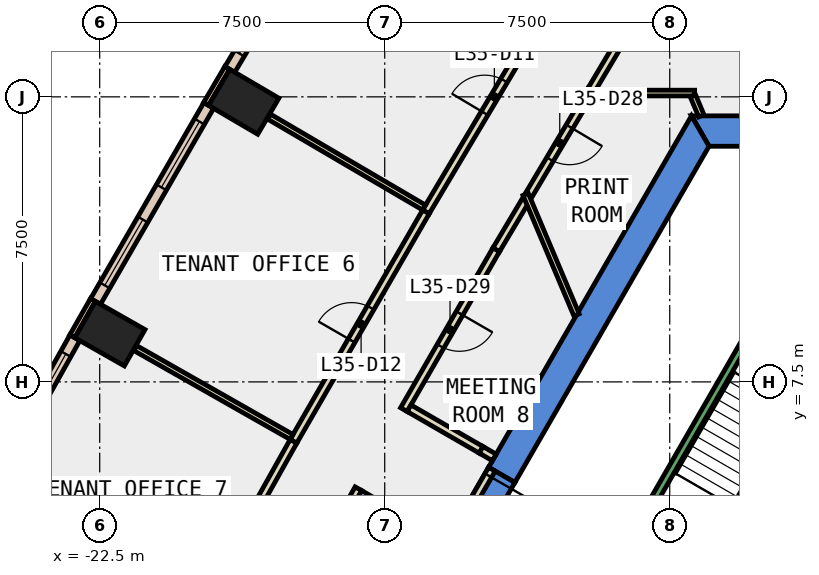
"""IFC4 building model, lengths in metres.
Left out: names, types, materials, properties, quantities, classifications, styles, units other than length and angle.
Written with IfcOpenShell. Run it as: python <this file> out.ifc"""

import sys

from ifc_helpers import new_model, si_unit, direction, frame, frame_2d, origin, origin_2d, place, context, subcontext, project, spatial, polyline, rectangle, outline, extrude, element, fill, save


model = new_model("IFC4")
c1 = context("Model", 3, precision=1e-05, world=origin(), true_north=direction((0.0, 1.0)))
c2 = subcontext(c1, "Body", "Model", "MODEL_VIEW")
j1 = project(units=[si_unit("LENGTHUNIT", "METRE"), si_unit("PLANEANGLEUNIT", "RADIAN")], contexts=[c1])
p1 = place(None, origin())
s1 = spatial("IfcSite", under=j1, at=p1, CompositionType="ELEMENT")
p2 = place(p1, origin())
s2 = spatial("IfcBuilding", under=s1, at=p2, CompositionType="ELEMENT")
p3 = place(p2, frame((0.0, 0.0, 159.2)))
s3 = spatial("IfcBuildingStorey", under=s2, at=p3, CompositionType="ELEMENT", Elevation=159.2)
for number, where, z_axis, x_axis in (
    (1, (-18.71, 14.87, -0.4), (0.0, 0.0, 1.0), (0.506, 0.863, 0.0)),
    (2, (-22.232, 8.769, -0.4), (0.0, 0.0, 1.0), (0.494, 0.869, 0.0)),
):
    element("IfcColumn", number, at=place(p3, frame(where, z_axis=z_axis, x_axis=x_axis)), inside=s3, PredefinedType="COLUMN", context=c2, shape_type="SweptSolid", body=[
        extrude(rectangle(XDim=1.1, YDim=1.5, at=origin_2d()), origin(), (0.0, 0.0, 1.0), 4.2),
    ])
p4 = place(p3, frame((0.0, 0.0, -0.4)))
e3 = element("IfcWall", 3, at=p4, inside=s3, PredefinedType="SHEAR", context=c2, shape_type="SweptSolid", body=[
    extrude(outline(polyline([(6.928, 14.5), (-6.928, 14.5), (-6.466, 13.7), (6.466, 13.7), (6.928, 14.5)])), origin(), (0.0, 0.0, 1.0), 4.2),
])
p5 = place(p3, frame((0.0, 0.0, -0.4)))
e4 = element("IfcWall", 4, at=p5, inside=s3, PredefinedType="SHEAR", context=c2, shape_type="SweptSolid", body=[
    extrude(outline(polyline([(-12.267, 5.252), (-11.575, 4.852), (-6.466, 13.7), (-6.928, 14.5), (-12.267, 5.252)])), origin(), (0.0, 0.0, 1.0), 4.2),
])
p6 = place(p3, frame((0.0, 0.0, 3.6)))
e5 = element("IfcWall", 5, at=p6, inside=s3, PredefinedType="SHEAR", context=c2, shape_type="SweptSolid", body=[
    extrude(outline(polyline([(-13.267, 3.52), (-12.575, 3.12), (-11.575, 4.852), (-12.267, 5.252), (-13.267, 3.52)])), origin(), (0.0, 0.0, 1.0), 0.2),
])
p7 = place(p3, frame((-19.143, 15.761, 0.0), z_axis=(0.0, 0.0, 1.0), x_axis=(-0.506505715302, -0.862236603472, 0.0)))
e6 = element("IfcWall", 6, at=p7, inside=s3, PredefinedType="STANDARD", context=c2, shape_type="SweptSolid", body=[
    extrude(rectangle(XDim=1.099, YDim=0.15, at=frame_2d((0.55, 0.0))), origin(), (0.0, 0.0, 1.0), 3.8),
])
p8 = place(p3, frame((-22.678, 9.655, 0.0), z_axis=(0.0, 0.0, 1.0), x_axis=(-0.494512685492, -0.869170411305, 0.0)))
e7 = element("IfcWall", 7, at=p8, inside=s3, PredefinedType="STANDARD", context=c2, shape_type="SweptSolid", body=[
    extrude(rectangle(XDim=1.1, YDim=0.15, at=frame_2d((0.55, 0.0))), origin(), (0.0, 0.0, 1.0), 3.8),
])
p9 = place(p3, frame((-16.029, 20.84, 0.0), z_axis=(0.0, 0.0, 1.0), x_axis=(-0.511455040009, -0.859310038374, 0.0)))
e8 = element("IfcWall", 8, at=p9, inside=s3, PredefinedType="STANDARD", context=c2, shape_type="SweptSolid", body=[
    extrude(rectangle(XDim=5.957, YDim=0.3, at=frame_2d((2.979, 0.0))), origin(), (0.0, 0.0, 1.0), 3.8),
])
p10 = place(p9, frame((0.489, 0.0, 0.9)))
e9 = element("IfcOpeningElement", 9, at=p10, cuts=e8, PredefinedType="OPENING", context=c2, shape_type="SweptSolid", body=[
    extrude(rectangle(XDim=2.0, YDim=2.6, at=frame_2d((1.0, 1.3))), frame((0.0, 0.16, 0.0), z_axis=(0.0, -1.0, 0.0), x_axis=(1.0, 0.0, 0.0)), (0.0, 0.0, 1.0), 0.32),
])
p11 = place(p9, frame((3.468, 0.0, 0.9)))
e10 = element("IfcOpeningElement", 10, at=p11, cuts=e8, PredefinedType="OPENING", context=c2, shape_type="SweptSolid", body=[
    extrude(rectangle(XDim=2.0, YDim=2.6, at=frame_2d((1.0, 1.3))), frame((0.0, 0.16, 0.0), z_axis=(0.0, -1.0, 0.0), x_axis=(1.0, 0.0, 0.0)), (0.0, 0.0, 1.0), 0.32),
])
p12 = place(p3, frame((-19.631, 14.774, 0.0), z_axis=(0.0, 0.0, 1.0), x_axis=(-0.500061823953, -0.865989706766, 0.0)))
e11 = element("IfcWall", 11, at=p12, inside=s3, PredefinedType="STANDARD", context=c2, shape_type="SweptSolid", body=[
    extrude(rectangle(XDim=5.957, YDim=0.3, at=frame_2d((2.979, 0.0))), origin(), (0.0, 0.0, 1.0), 3.8),
])
p13 = place(p12, frame((0.489, 0.0, 0.9)))
e12 = element("IfcOpeningElement", 12, at=p13, cuts=e11, PredefinedType="OPENING", context=c2, shape_type="SweptSolid", body=[
    extrude(rectangle(XDim=2.0, YDim=2.6, at=frame_2d((1.0, 1.3))), frame((0.0, 0.16, 0.0), z_axis=(0.0, -1.0, 0.0), x_axis=(1.0, 0.0, 0.0)), (0.0, 0.0, 1.0), 0.32),
])
p14 = place(p12, frame((3.468, 0.0, 0.9)))
e13 = element("IfcOpeningElement", 13, at=p14, cuts=e11, PredefinedType="OPENING", context=c2, shape_type="SweptSolid", body=[
    extrude(rectangle(XDim=2.0, YDim=2.6, at=frame_2d((1.0, 1.3))), frame((0.0, 0.16, 0.0), z_axis=(0.0, -1.0, 0.0), x_axis=(1.0, 0.0, 0.0)), (0.0, 0.0, 1.0), 0.32),
])
p15 = place(p3, frame((-23.153, 8.661, 0.0), z_axis=(0.0, 0.0, 1.0), x_axis=(-0.488354983501, -0.872645065356, 0.0)))
e14 = element("IfcWall", 14, at=p15, inside=s3, PredefinedType="STANDARD", context=c2, shape_type="SweptSolid", body=[
    extrude(rectangle(XDim=5.957, YDim=0.3, at=frame_2d((2.978, 0.0))), origin(), (0.0, 0.0, 1.0), 3.8),
])
p16 = place(p15, frame((0.489, 0.0, 0.9)))
e15 = element("IfcOpeningElement", 15, at=p16, cuts=e14, PredefinedType="OPENING", context=c2, shape_type="SweptSolid", body=[
    extrude(rectangle(XDim=2.0, YDim=2.6, at=frame_2d((1.0, 1.3))), frame((0.0, 0.16, 0.0), z_axis=(0.0, -1.0, 0.0), x_axis=(1.0, 0.0, 0.0)), (0.0, 0.0, 1.0), 0.32),
])
p17 = place(p15, frame((3.467, 0.0, 0.9)))
e16 = element("IfcOpeningElement", 16, at=p17, cuts=e14, PredefinedType="OPENING", context=c2, shape_type="SweptSolid", body=[
    extrude(rectangle(XDim=2.0, YDim=2.6, at=frame_2d((1.0, 1.3))), frame((0.0, 0.16, 0.0), z_axis=(0.0, -1.0, 0.0), x_axis=(1.0, 0.0, 0.0)), (0.0, 0.0, 1.0), 0.32),
])
p18 = place(p3, frame((-9.574, 15.164, 0.0), z_axis=(0.0, 0.0, 1.0), x_axis=(-0.511482522046, -0.859293680671, 0.0)))
e17 = element("IfcWall", 17, at=p18, inside=s3, PredefinedType="PARTITIONING", context=c2, shape_type="SweptSolid", body=[
    extrude(rectangle(XDim=3.208, YDim=0.2, at=frame_2d((1.604, 0.0))), origin(), (0.0, 0.0, 1.0), 3.8),
])
p19 = place(p18, frame((1.104, 0.0, 0.0)))
e18 = element("IfcOpeningElement", 18, at=p19, cuts=e17, PredefinedType="OPENING", context=c2, shape_type="SweptSolid", body=[
    extrude(rectangle(XDim=1.0, YDim=2.1, at=frame_2d((0.5, 1.05))), frame((0.0, 0.11, 0.0), z_axis=(0.0, -1.0, 0.0), x_axis=(1.0, 0.0, 0.0)), (0.0, 0.0, 1.0), 0.22),
])
p20 = place(p3, frame((-11.291, 12.278, 0.0), z_axis=(0.0, 0.0, 1.0), x_axis=(-0.511628198266, -0.859206952217, 0.0)))
e19 = element("IfcWall", 19, at=p20, inside=s3, PredefinedType="PARTITIONING", context=c2, shape_type="SweptSolid", body=[
    extrude(rectangle(XDim=1.517, YDim=0.2, at=frame_2d((0.758, 0.0))), origin(), (0.0, 0.0, 1.0), 3.8),
])
p21 = place(p3, frame((-12.067, 10.975, 0.0), z_axis=(0.0, 0.0, 1.0), x_axis=(-0.500215616273, -0.865900881878, 0.0)))
e20 = element("IfcWall", 20, at=p21, inside=s3, PredefinedType="PARTITIONING", context=c2, shape_type="SweptSolid", body=[
    extrude(rectangle(XDim=4.856, YDim=0.2, at=frame_2d((2.428, 0.0))), origin(), (0.0, 0.0, 1.0), 3.8),
])
p22 = place(p21, frame((1.928, 0.0, 0.0)))
e21 = element("IfcOpeningElement", 21, at=p22, cuts=e20, PredefinedType="OPENING", context=c2, shape_type="SweptSolid", body=[
    extrude(rectangle(XDim=1.0, YDim=2.1, at=frame_2d((0.5, 1.05))), frame((0.0, 0.11, 0.0), z_axis=(0.0, -1.0, 0.0), x_axis=(1.0, 0.0, 0.0)), (0.0, 0.0, 1.0), 0.22),
])
p23 = place(p3, frame((-14.359, 6.806, 0.0), z_axis=(0.0, 0.0, 1.0), x_axis=(0.866155875717, -0.499773947861, 0.0)))
e22 = element("IfcWall", 22, at=p23, inside=s3, PredefinedType="PARTITIONING", context=c2, shape_type="SweptSolid", body=[
    extrude(rectangle(XDim=2.189, YDim=0.2, at=frame_2d((1.094, 0.0))), origin(), (0.0, 0.0, 1.0), 3.8),
])
p24 = place(p3, frame((-8.516, 16.942, 0.0), z_axis=(0.0, 0.0, 1.0), x_axis=(-0.511351070319, -0.859371911854, 0.0)))
e23 = element("IfcWall", 23, at=p24, inside=s3, PredefinedType="PARTITIONING", context=c2, shape_type="SweptSolid", body=[
    extrude(rectangle(XDim=2.069, YDim=0.2, at=frame_2d((1.034, 0.0))), origin(), (0.0, 0.0, 1.0), 3.8),
])
p25 = place(p3, frame((-15.692, 4.689, 0.0), z_axis=(0.0, 0.0, 1.0), x_axis=(-0.48849233301, -0.872568186786, 0.0)))
e24 = element("IfcWall", 24, at=p25, inside=s3, PredefinedType="PARTITIONING", context=c2, shape_type="SweptSolid", body=[
    extrude(rectangle(XDim=6.629, YDim=0.2, at=frame_2d((3.314, 0.0))), origin(), (0.0, 0.0, 1.0), 3.8),
])
p26 = place(p25, frame((2.814, 0.0, 0.0)))
e25 = element("IfcOpeningElement", 25, at=p26, cuts=e24, PredefinedType="OPENING", context=c2, shape_type="SweptSolid", body=[
    extrude(rectangle(XDim=1.0, YDim=2.1, at=frame_2d((0.5, 1.05))), frame((0.0, 0.11, 0.0), z_axis=(0.0, -1.0, 0.0), x_axis=(1.0, 0.0, 0.0)), (0.0, 0.0, 1.0), 0.22),
])
p27 = place(p3, frame((-13.917, 11.973, 0.0), z_axis=(0.0, 0.0, 1.0), x_axis=(0.511455840413, 0.859309561978, 0.0)))
e26 = element("IfcWall", 26, at=p27, inside=s3, PredefinedType="PARTITIONING", context=c2, shape_type="SweptSolid", body=[
    extrude(rectangle(XDim=7.047, YDim=0.2, at=frame_2d((3.523, 0.0))), origin(), (0.0, 0.0, 1.0), 3.8),
])
p28 = place(p27, frame((3.023, 0.0, 0.0)))
e27 = element("IfcOpeningElement", 27, at=p28, cuts=e26, PredefinedType="OPENING", context=c2, shape_type="SweptSolid", body=[
    extrude(rectangle(XDim=1.0, YDim=2.1, at=frame_2d((0.5, 1.05))), frame((0.0, 0.11, 0.0), z_axis=(0.0, -1.0, 0.0), x_axis=(1.0, 0.0, 0.0)), (0.0, 0.0, 1.0), 0.22),
])
p29 = place(p3, frame((-17.402, 5.936, 0.0), z_axis=(0.0, 0.0, 1.0), x_axis=(0.500135788517, 0.865946992052, 0.0)))
e28 = element("IfcWall", 28, at=p29, inside=s3, PredefinedType="PARTITIONING", context=c2, shape_type="SweptSolid", body=[
    extrude(rectangle(XDim=6.97, YDim=0.2, at=frame_2d((3.485, 0.0))), origin(), (0.0, 0.0, 1.0), 3.8),
])
p30 = place(p29, frame((3.06, 0.0, 0.0)))
e29 = element("IfcOpeningElement", 29, at=p30, cuts=e28, PredefinedType="OPENING", context=c2, shape_type="SweptSolid", body=[
    extrude(rectangle(XDim=1.0, YDim=2.1, at=frame_2d((0.5, 1.05))), frame((0.0, 0.11, 0.0), z_axis=(0.0, -1.0, 0.0), x_axis=(1.0, 0.0, 0.0)), (0.0, 0.0, 1.0), 0.22),
])
p31 = place(p3, frame((-20.769, -0.082, 0.0), z_axis=(0.0, 0.0, 1.0), x_axis=(0.488387759141, 0.872626722443, 0.0)))
e30 = element("IfcWall", 30, at=p31, inside=s3, PredefinedType="PARTITIONING", context=c2, shape_type="SweptSolid", body=[
    extrude(rectangle(XDim=6.896, YDim=0.2, at=frame_2d((3.448, 0.0))), origin(), (0.0, 0.0, 1.0), 3.8),
])
p32 = place(p3, frame((-9.952, 9.262, 0.0), z_axis=(0.0, 0.0, 1.0), x_axis=(-0.38905491579, 0.921214563769, 0.0)))
e31 = element("IfcWall", 31, at=p32, inside=s3, PredefinedType="PARTITIONING", context=c2, shape_type="SweptSolid", body=[
    extrude(rectangle(XDim=3.445, YDim=0.15, at=frame_2d((1.722, 0.0))), origin(), (0.0, 0.0, 1.0), 3.8),
])
p33 = place(p3, frame((-6.846, 15.1, 0.0), z_axis=(0.0, 0.0, 1.0), x_axis=(-1.0, 0.0, 0.0)))
e32 = element("IfcWall", 32, at=p33, inside=s3, PredefinedType="PARTITIONING", context=c2, shape_type="SweptSolid", body=[
    extrude(rectangle(XDim=2.766, YDim=0.15, at=frame_2d((1.383, 0.0))), origin(), (0.0, 0.0, 1.0), 3.8),
])
p34 = place(p3, frame((-6.668, 14.5, 0.0), z_axis=(0.0, 0.0, 1.0), x_axis=(-0.388852201086, 0.921300149631, 0.0)))
e33 = element("IfcWall", 33, at=p34, inside=s3, PredefinedType="PARTITIONING", context=c2, shape_type="SweptSolid", body=[
    extrude(rectangle(XDim=0.576, YDim=0.15, at=frame_2d((0.288, 0.0))), origin(), (0.0, 0.0, 1.0), 3.8),
])
p35 = place(p3, frame((-13.965, 12.088, 0.0), z_axis=(0.0, 0.0, 1.0), x_axis=(-0.862617990649, 0.50585591052, 0.0)))
e34 = element("IfcWall", 34, at=p35, inside=s3, PredefinedType="PARTITIONING", context=c2, shape_type="SweptSolid", body=[
    extrude(rectangle(XDim=4.731, YDim=0.15, at=frame_2d((2.365, 0.0))), origin(), (0.0, 0.0, 1.0), 3.8),
])
p36 = place(p3, frame((-17.451, 6.051, 0.0), z_axis=(0.0, 0.0, 1.0), x_axis=(-0.869409691741, 0.494091882049, 0.0)))
e35 = element("IfcWall", 35, at=p36, inside=s3, PredefinedType="PARTITIONING", context=c2, shape_type="SweptSolid", body=[
    extrude(rectangle(XDim=4.73, YDim=0.15, at=frame_2d((2.365, 0.0))), origin(), (0.0, 0.0, 1.0), 3.8),
])
p37 = place(p3, frame((-12.18, 5.202, 0.0), z_axis=(0.0, 0.0, 1.0), x_axis=(-0.50002537861, -0.866010750942, 0.0)))
e36 = element("IfcWall", 36, at=p37, inside=s3, PredefinedType="PARTITIONING", context=c2, shape_type="SweptSolid", body=[
    extrude(rectangle(XDim=2.0, YDim=0.2, at=frame_2d((1.0, 0.0))), origin(), (0.0, 0.0, 1.0), 2.4),
])
p38 = place(p37, frame((0.19, 0.0, 0.0)))
e37 = element("IfcOpeningElement", 37, at=p38, cuts=e36, PredefinedType="OPENING", context=c2, shape_type="SweptSolid", body=[
    extrude(rectangle(XDim=1.8, YDim=2.1, at=frame_2d((0.9, 1.05))), frame((0.0, 0.11, 0.0), z_axis=(0.0, -1.0, 0.0), x_axis=(1.0, 0.0, 0.0)), (0.0, 0.0, 1.0), 0.22),
])
p39 = place(p3, frame((-12.463, 5.712, 0.0), z_axis=(0.0, 0.0, 1.0), x_axis=(0.865788603161, -0.500409926597, 0.0)))
e38 = element("IfcWall", 38, at=p39, inside=s3, PredefinedType="PARTITIONING", context=c2, shape_type="SweptSolid", body=[
    extrude(rectangle(XDim=0.4, YDim=0.2, at=frame_2d((0.2, 0.0))), origin(), (0.0, 0.0, 1.0), 2.4),
])
p40 = place(p3, frame((-13.764, 3.46, 0.0), z_axis=(0.0, 0.0, 1.0), x_axis=(-0.865872609263, 0.500264554538, 0.0)))
e39 = element("IfcWall", 39, at=p40, inside=s3, PredefinedType="PARTITIONING", context=c2, shape_type="SweptSolid", body=[
    extrude(rectangle(XDim=2.183, YDim=0.2, at=frame_2d((1.091, 0.0))), origin(), (0.0, 0.0, 1.0), 3.8),
])
p41 = place(p3, frame((-5.03, 9.388, 0.0), z_axis=(0.0, 0.0, 1.0), x_axis=(-0.499978703459, -0.866037698999, 0.0)))
e40 = element("IfcWall", 40, at=p41, inside=s3, PredefinedType="STANDARD", context=c2, shape_type="SweptSolid", body=[
    extrude(rectangle(XDim=6.9, YDim=0.2, at=frame_2d((3.45, 0.0))), origin(), (0.0, 0.0, 1.0), 3.8),
])
p42 = place(p11, origin())
e41 = element("IfcWindow", 41, at=p42, inside=s3, PartitioningType="SINGLE_PANEL", PredefinedType="WINDOW", context=c2, shape_type="SweptSolid", body=[
    extrude(rectangle(XDim=2.0, YDim=2.6, at=frame_2d((1.0, 1.3))), frame((0.0, 0.03, 0.0), z_axis=(0.0, -1.0, 0.0), x_axis=(1.0, 0.0, 0.0)), (0.0, 0.0, 1.0), 0.06),
])
fill(e10, e41)
p43 = place(p13, origin())
e42 = element("IfcWindow", 42, at=p43, inside=s3, PartitioningType="SINGLE_PANEL", PredefinedType="WINDOW", context=c2, shape_type="SweptSolid", body=[
    extrude(rectangle(XDim=2.0, YDim=2.6, at=frame_2d((1.0, 1.3))), frame((0.0, 0.03, 0.0), z_axis=(0.0, -1.0, 0.0), x_axis=(1.0, 0.0, 0.0)), (0.0, 0.0, 1.0), 0.06),
])
fill(e12, e42)
p44 = place(p14, origin())
e43 = element("IfcWindow", 43, at=p44, inside=s3, PartitioningType="SINGLE_PANEL", PredefinedType="WINDOW", context=c2, shape_type="SweptSolid", body=[
    extrude(rectangle(XDim=2.0, YDim=2.6, at=frame_2d((1.0, 1.3))), frame((0.0, 0.03, 0.0), z_axis=(0.0, -1.0, 0.0), x_axis=(1.0, 0.0, 0.0)), (0.0, 0.0, 1.0), 0.06),
])
fill(e13, e43)
p45 = place(p16, origin())
e44 = element("IfcWindow", 44, at=p45, inside=s3, PartitioningType="SINGLE_PANEL", PredefinedType="WINDOW", context=c2, shape_type="SweptSolid", body=[
    extrude(rectangle(XDim=2.0, YDim=2.6, at=frame_2d((1.0, 1.3))), frame((0.0, 0.03, 0.0), z_axis=(0.0, -1.0, 0.0), x_axis=(1.0, 0.0, 0.0)), (0.0, 0.0, 1.0), 0.06),
])
fill(e15, e44)
p46 = place(p28, origin())
e45 = element("IfcDoor", 45, at=p46, inside=s3, OperationType="SINGLE_SWING_LEFT", PredefinedType="DOOR", context=c2, shape_type="SweptSolid", body=[
    extrude(rectangle(XDim=1.0, YDim=2.1, at=frame_2d((0.5, 1.05))), frame((0.0, 0.025, 0.0), z_axis=(0.0, -1.0, 0.0), x_axis=(1.0, 0.0, 0.0)), (0.0, 0.0, 1.0), 0.05),
])
fill(e27, e45)
p47 = place(p30, origin())
e46 = element("IfcDoor", 46, at=p47, inside=s3, OperationType="SINGLE_SWING_LEFT", PredefinedType="DOOR", context=c2, shape_type="SweptSolid", body=[
    extrude(rectangle(XDim=1.0, YDim=2.1, at=frame_2d((0.5, 1.05))), frame((0.0, 0.025, 0.0), z_axis=(0.0, -1.0, 0.0), x_axis=(1.0, 0.0, 0.0)), (0.0, 0.0, 1.0), 0.05),
])
fill(e29, e46)
p48 = place(p19, origin())
e47 = element("IfcDoor", 47, at=p48, inside=s3, OperationType="SINGLE_SWING_RIGHT", PredefinedType="DOOR", context=c2, shape_type="SweptSolid", body=[
    extrude(rectangle(XDim=1.0, YDim=2.1, at=frame_2d((0.5, 1.05))), frame((0.0, 0.025, 0.0), z_axis=(0.0, -1.0, 0.0), x_axis=(1.0, 0.0, 0.0)), (0.0, 0.0, 1.0), 0.05),
])
fill(e18, e47)
p49 = place(p22, origin())
e48 = element("IfcDoor", 48, at=p49, inside=s3, OperationType="SINGLE_SWING_LEFT", PredefinedType="DOOR", context=c2, shape_type="SweptSolid", body=[
    extrude(rectangle(XDim=1.0, YDim=2.1, at=frame_2d((0.5, 1.05))), frame((0.0, 0.025, 0.0), z_axis=(0.0, -1.0, 0.0), x_axis=(1.0, 0.0, 0.0)), (0.0, 0.0, 1.0), 0.05),
])
fill(e21, e48)
p50 = place(p38, origin())
e49 = element("IfcDoor", 49, at=p50, inside=s3, OperationType="DOUBLE_DOOR_SINGLE_SWING", PredefinedType="DOOR", context=c2, shape_type="SweptSolid", body=[
    extrude(rectangle(XDim=1.8, YDim=2.1, at=frame_2d((0.9, 1.05))), frame((0.0, 0.025, 0.0), z_axis=(0.0, -1.0, 0.0), x_axis=(1.0, 0.0, 0.0)), (0.0, 0.0, 1.0), 0.05),
])
fill(e37, e49)
save(model, sys.argv[1])
